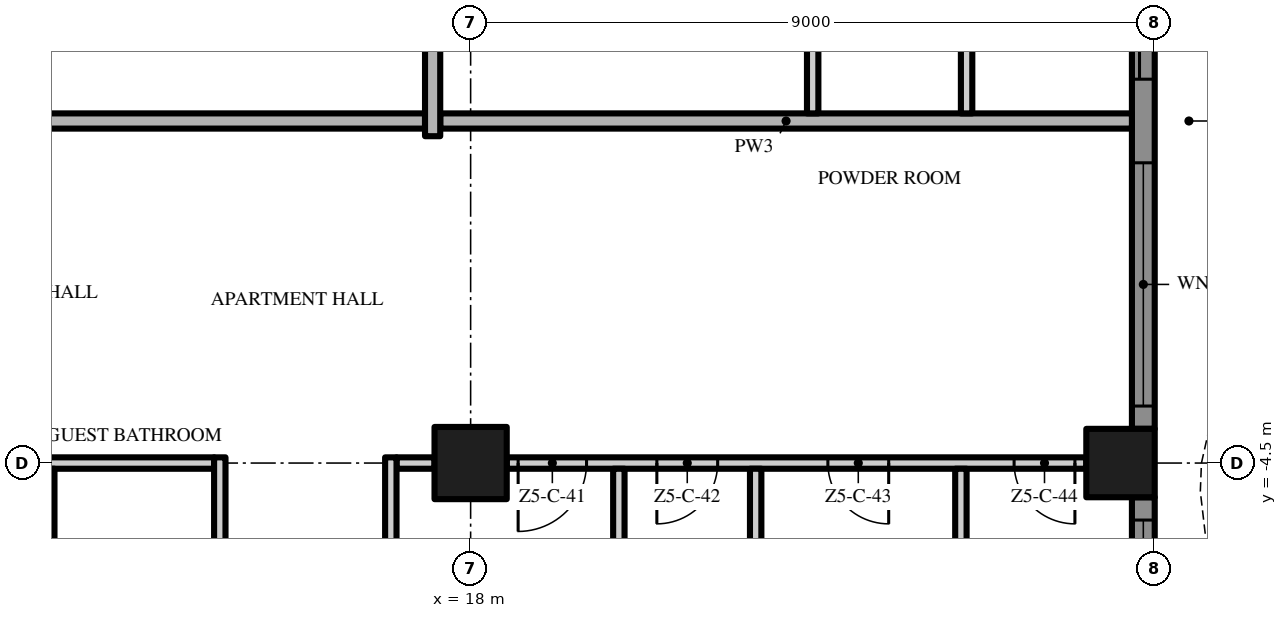
"""IFC4 building model, lengths in metres.
Left out: names, types, materials, properties, quantities, classifications, styles, units other than length and angle.
Written with IfcOpenShell. Run it as: python <this file> out.ifc"""

import sys

from ifc_helpers import new_model, si_unit, direction, frame, frame_2d, origin, origin_2d, place, context, subcontext, project, spatial, polyline, rectangle, outline, extrude, element, fill, save


model = new_model("IFC4")
c1 = context("Model", 3, precision=1e-05, world=origin(), true_north=direction((0.0, 1.0)))
c2 = subcontext(c1, "Body", "Model", "MODEL_VIEW")
j1 = project(units=[si_unit("LENGTHUNIT", "METRE"), si_unit("PLANEANGLEUNIT", "RADIAN")], contexts=[c1])
p1 = place(None, origin())
s1 = spatial("IfcSite", under=j1, at=p1, CompositionType="ELEMENT")
p2 = place(p1, origin())
s2 = spatial("IfcBuilding", under=s1, at=p2, CompositionType="ELEMENT")
p3 = place(p2, frame((0.0, 0.0, 269.2)))
s3 = spatial("IfcBuildingStorey", under=s2, at=p3, CompositionType="ELEMENT", Elevation=269.2)
p4 = place(p3, frame((18.0, -4.5, 0.0), z_axis=(0.0, 0.0, 1.0), x_axis=(1.0, 0.0, 0.0)))
e1 = element("IfcColumn", 1, at=p4, inside=s3, PredefinedType="COLUMN", context=c2, shape_type="SweptSolid", body=[
    extrude(rectangle(XDim=0.95, YDim=0.95, at=origin_2d()), origin(), (0.0, 0.0, 1.0), 3.5),
])
p5 = place(p3, frame((26.55, -4.5, 0.0), z_axis=(0.0, 0.0, 1.0), x_axis=(1.0, 0.0, 0.0)))
e2 = element("IfcColumn", 2, at=p5, inside=s3, PredefinedType="COLUMN", context=c2, shape_type="SweptSolid", body=[
    extrude(rectangle(XDim=0.9, YDim=0.9, at=origin_2d()), origin(), (0.0, 0.0, 1.0), 3.5),
])
p6 = place(p3, frame((26.85, -4.95, 0.0), z_axis=(0.0, 0.0, 1.0), x_axis=(0.0, -1.0, 0.0)))
e3 = element("IfcWall", 3, at=p6, inside=s3, PredefinedType="SOLIDWALL", context=c2, shape_type="SweptSolid", body=[
    extrude(rectangle(XDim=8.1, YDim=0.3, at=frame_2d((4.05, 0.0))), origin(), (0.0, 0.0, 1.0), 3.5),
])
p7 = place(p6, frame((4.6, 0.0, 0.0)))
e4 = element("IfcOpeningElement", 4, at=p7, cuts=e3, PredefinedType="OPENING", context=c2, shape_type="SweptSolid", body=[
    extrude(rectangle(XDim=3.2, YDim=2.4, at=frame_2d((1.6, 1.2))), frame((0.0, 0.16, 0.0), z_axis=(0.0, -1.0, 0.0), x_axis=(1.0, 0.0, 0.0)), (0.0, 0.0, 1.0), 0.32),
])
p8 = place(p6, frame((0.3, 0.0, 0.45)))
e5 = element("IfcOpeningElement", 5, at=p8, cuts=e3, PredefinedType="OPENING", context=c2, shape_type="SweptSolid", body=[
    extrude(rectangle(XDim=3.2, YDim=2.65, at=frame_2d((1.6, 1.325))), frame((0.0, 0.16, 0.0), z_axis=(0.0, -1.0, 0.0), x_axis=(1.0, 0.0, 0.0)), (0.0, 0.0, 1.0), 0.32),
])
p9 = place(p3, frame((26.85, 4.05, 0.0), z_axis=(0.0, 0.0, 1.0), x_axis=(0.0, -1.0, 0.0)))
e6 = element("IfcWall", 6, at=p9, inside=s3, PredefinedType="SOLIDWALL", context=c2, shape_type="SweptSolid", body=[
    extrude(rectangle(XDim=8.1, YDim=0.3, at=frame_2d((4.05, 0.0))), origin(), (0.0, 0.0, 1.0), 3.5),
])
p10 = place(p9, frame((4.6, 0.0, 0.45)))
e7 = element("IfcOpeningElement", 7, at=p10, cuts=e6, PredefinedType="OPENING", context=c2, shape_type="SweptSolid", body=[
    extrude(rectangle(XDim=3.2, YDim=2.65, at=frame_2d((1.6, 1.325))), frame((0.0, 0.16, 0.0), z_axis=(0.0, -1.0, 0.0), x_axis=(1.0, 0.0, 0.0)), (0.0, 0.0, 1.0), 0.32),
])
p11 = place(p9, frame((0.3, 0.0, 0.0)))
e8 = element("IfcOpeningElement", 8, at=p11, cuts=e6, PredefinedType="OPENING", context=c2, shape_type="SweptSolid", body=[
    extrude(rectangle(XDim=3.2, YDim=2.4, at=frame_2d((1.6, 1.2))), frame((0.0, 0.16, 0.0), z_axis=(0.0, -1.0, 0.0), x_axis=(1.0, 0.0, 0.0)), (0.0, 0.0, 1.0), 0.32),
])
p12 = place(p3, origin())
e9 = element("IfcWall", 9, at=p12, inside=s3, PredefinedType="USERDEFINED", context=c2, shape_type="SweptSolid", body=[
    extrude(outline(polyline([(27.951, -18.0), (28.612, -16.5), (29.345, -15.0), (29.869, -13.5), (30.0, -12.375), (29.985, -12.0), (29.649, -10.5), (28.988, -9.0), (28.255, -7.5), (27.731, -6.0), (27.6, -4.875), (27.615, -4.5), (27.951, -3.0), (28.612, -1.5), (29.345, 0.0), (29.869, 1.5), (30.0, 2.625), (29.985, 3.0), (29.649, 4.5), (28.988, 6.0), (28.255, 7.5), (27.731, 9.0), (27.6, 10.125), (27.615, 10.5), (27.951, 12.0), (28.612, 13.5), (29.345, 15.0), (29.869, 16.5), (30.0, 17.625), (29.985, 18.0), (29.735, 17.99), (29.749, 17.635), (29.624, 16.556), (29.114, 15.096), (28.385, 13.605), (27.713, 12.079), (27.366, 10.533), (27.349, 10.115), (27.486, 8.944), (28.024, 7.404), (28.761, 5.895), (29.41, 4.421), (29.736, 2.967), (29.749, 2.635), (29.624, 1.556), (29.114, 0.096), (28.385, -1.395), (27.713, -2.921), (27.366, -4.467), (27.349, -4.885), (27.486, -6.056), (28.024, -7.596), (28.761, -9.105), (29.41, -10.579), (29.736, -12.033), (29.749, -12.365), (29.624, -13.444), (29.114, -14.904), (28.385, -16.395), (27.723, -17.899), (27.951, -18.0)])), origin(), (0.0, 0.0, 1.0), 0.9),
])
p13 = place(p3, frame((9.475, -4.5, 0.0), z_axis=(0.0, 0.0, 1.0), x_axis=(1.0, 0.0, 0.0)))
e10 = element("IfcWall", 10, at=p13, inside=s3, PredefinedType="PARTITIONING", context=c2, shape_type="SweptSolid", body=[
    extrude(rectangle(XDim=5.15, YDim=0.15, at=frame_2d((2.575, 0.0))), origin(), (0.0, 0.0, 1.0), 3.5),
])
p14 = place(p3, frame((17.025, -4.5, 0.0), z_axis=(0.0, 0.0, 1.0), x_axis=(1.0, 0.0, 0.0)))
e11 = element("IfcWall", 11, at=p14, inside=s3, PredefinedType="PARTITIONING", context=c2, shape_type="SweptSolid", body=[
    extrude(rectangle(XDim=0.5, YDim=0.15, at=frame_2d((0.25, 0.0))), origin(), (0.0, 0.0, 1.0), 3.5),
])
p15 = place(p3, frame((26.1, -4.5, 0.0), z_axis=(0.0, 0.0, 1.0), x_axis=(-1.0, 0.0, 0.0)))
e12 = element("IfcWall", 12, at=p15, inside=s3, PredefinedType="PARTITIONING", context=c2, shape_type="SweptSolid", body=[
    extrude(rectangle(XDim=7.625, YDim=0.15, at=frame_2d((3.812, 0.0))), origin(), (0.0, 0.0, 1.0), 3.5),
])
p16 = place(p15, frame((6.575, 0.0, 0.0)))
e13 = element("IfcOpeningElement", 13, at=p16, cuts=e12, PredefinedType="OPENING", context=c2, shape_type="SweptSolid", body=[
    extrude(rectangle(XDim=0.9, YDim=2.1, at=frame_2d((0.45, 1.05))), frame((0.0, 0.085, 0.0), z_axis=(0.0, -1.0, 0.0), x_axis=(1.0, 0.0, 0.0)), (0.0, 0.0, 1.0), 0.17),
])
p17 = place(p15, frame((4.85, 0.0, 0.0)))
e14 = element("IfcOpeningElement", 14, at=p17, cuts=e12, PredefinedType="OPENING", context=c2, shape_type="SweptSolid", body=[
    extrude(rectangle(XDim=0.8, YDim=2.0, at=frame_2d((0.4, 1.0))), frame((0.0, 0.085, 0.0), z_axis=(0.0, -1.0, 0.0), x_axis=(1.0, 0.0, 0.0)), (0.0, 0.0, 1.0), 0.17),
])
p18 = place(p15, frame((2.6, 0.0, 0.0)))
e15 = element("IfcOpeningElement", 15, at=p18, cuts=e12, PredefinedType="OPENING", context=c2, shape_type="SweptSolid", body=[
    extrude(rectangle(XDim=0.8, YDim=2.0, at=frame_2d((0.4, 1.0))), frame((0.0, 0.085, 0.0), z_axis=(0.0, -1.0, 0.0), x_axis=(1.0, 0.0, 0.0)), (0.0, 0.0, 1.0), 0.17),
])
p19 = place(p15, frame((0.15, 0.0, 0.0)))
e16 = element("IfcOpeningElement", 16, at=p19, cuts=e12, PredefinedType="OPENING", context=c2, shape_type="SweptSolid", body=[
    extrude(rectangle(XDim=0.8, YDim=2.0, at=frame_2d((0.4, 1.0))), frame((0.0, 0.085, 0.0), z_axis=(0.0, -1.0, 0.0), x_axis=(1.0, 0.0, 0.0)), (0.0, 0.0, 1.0), 0.17),
])
p20 = place(p3, frame((17.4, 0.0, 0.0), z_axis=(0.0, 0.0, 1.0), x_axis=(-1.0, 0.0, 0.0)))
e17 = element("IfcWall", 17, at=p20, inside=s3, PredefinedType="PARTITIONING", context=c2, shape_type="SweptSolid", body=[
    extrude(rectangle(XDim=34.8, YDim=0.2, at=frame_2d((17.4, 0.0))), origin(), (0.0, 0.0, 1.0), 3.5),
])
p21 = place(p20, frame((23.4, 0.0, 0.0)))
e18 = element("IfcOpeningElement", 18, at=p21, cuts=e17, PredefinedType="OPENING", context=c2, shape_type="SweptSolid", body=[
    extrude(rectangle(XDim=1.5, YDim=2.4, at=frame_2d((0.75, 1.2))), frame((0.0, 0.11, 0.0), z_axis=(0.0, -1.0, 0.0), x_axis=(1.0, 0.0, 0.0)), (0.0, 0.0, 1.0), 0.22),
])
p22 = place(p20, frame((5.4, 0.0, 0.0)))
e19 = element("IfcOpeningElement", 19, at=p22, cuts=e17, PredefinedType="OPENING", context=c2, shape_type="SweptSolid", body=[
    extrude(rectangle(XDim=1.5, YDim=2.4, at=frame_2d((0.75, 1.2))), frame((0.0, 0.11, 0.0), z_axis=(0.0, -1.0, 0.0), x_axis=(1.0, 0.0, 0.0)), (0.0, 0.0, 1.0), 0.22),
])
p23 = place(p3, frame((17.6, 0.0, 0.0), z_axis=(0.0, 0.0, 1.0), x_axis=(1.0, 0.0, 0.0)))
e20 = element("IfcWall", 20, at=p23, inside=s3, PredefinedType="PARTITIONING", context=c2, shape_type="SweptSolid", body=[
    extrude(rectangle(XDim=9.1, YDim=0.2, at=frame_2d((4.55, 0.0))), origin(), (0.0, 0.0, 1.0), 3.5),
])
p24 = place(p3, frame((12.45, -8.925, 0.0), z_axis=(0.0, 0.0, 1.0), x_axis=(0.0, 1.0, 0.0)))
e21 = element("IfcWall", 21, at=p24, inside=s3, PredefinedType="PARTITIONING", context=c2, shape_type="SweptSolid", body=[
    extrude(rectangle(XDim=4.35, YDim=0.15, at=frame_2d((2.175, 0.0))), origin(), (0.0, 0.0, 1.0), 3.5),
])
p25 = place(p3, frame((14.7, -9.075, 0.0), z_axis=(0.0, 0.0, 1.0), x_axis=(0.0, 1.0, 0.0)))
e22 = element("IfcWall", 22, at=p25, inside=s3, PredefinedType="PARTITIONING", context=c2, shape_type="SweptSolid", body=[
    extrude(rectangle(XDim=4.65, YDim=0.15, at=frame_2d((2.325, 0.0))), origin(), (0.0, 0.0, 1.0), 3.5),
])
p26 = place(p25, frame((1.875, 0.0, 0.0)))
e23 = element("IfcOpeningElement", 23, at=p26, cuts=e22, PredefinedType="OPENING", context=c2, shape_type="SweptSolid", body=[
    extrude(rectangle(XDim=0.9, YDim=2.1, at=frame_2d((0.45, 1.05))), frame((0.0, 0.085, 0.0), z_axis=(0.0, -1.0, 0.0), x_axis=(1.0, 0.0, 0.0)), (0.0, 0.0, 1.0), 0.17),
])
p27 = place(p3, frame((16.95, -9.075, 0.0), z_axis=(0.0, 0.0, 1.0), x_axis=(0.0, 1.0, 0.0)))
e24 = element("IfcWall", 24, at=p27, inside=s3, PredefinedType="PARTITIONING", context=c2, shape_type="SweptSolid", body=[
    extrude(rectangle(XDim=4.65, YDim=0.15, at=frame_2d((2.325, 0.0))), origin(), (0.0, 0.0, 1.0), 3.5),
])
p28 = place(p3, frame((17.5, -0.2, 0.0), z_axis=(0.0, 0.0, 1.0), x_axis=(0.0, 1.0, 0.0)))
e25 = element("IfcWall", 25, at=p28, inside=s3, PredefinedType="PARTITIONING", context=c2, shape_type="SweptSolid", body=[
    extrude(rectangle(XDim=4.225, YDim=0.2, at=frame_2d((2.112, 0.0))), origin(), (0.0, 0.0, 1.0), 3.5),
])
for number, where, z_axis, x_axis in (
    (26, (19.95, -8.925, 0.0), (0.0, 0.0, 1.0), (0.0, 1.0, 0.0)),
    (27, (21.75, -8.925, 0.0), (0.0, 0.0, 1.0), (0.0, 1.0, 0.0)),
):
    element("IfcWall", number, at=place(p3, frame(where, z_axis=z_axis, x_axis=x_axis)), inside=s3, PredefinedType="PARTITIONING", context=c2, shape_type="SweptSolid", body=[
        extrude(rectangle(XDim=4.35, YDim=0.15, at=frame_2d((2.175, 0.0))), origin(), (0.0, 0.0, 1.0), 3.5),
    ])
p29 = place(p3, frame((22.5, 17.55, 0.0), z_axis=(0.0, 0.0, 1.0), x_axis=(0.0, -1.0, 0.0)))
e28 = element("IfcWall", 28, at=p29, inside=s3, PredefinedType="PARTITIONING", context=c2, shape_type="SweptSolid", body=[
    extrude(rectangle(XDim=17.45, YDim=0.15, at=frame_2d((8.725, 0.0))), origin(), (0.0, 0.0, 1.0), 3.5),
])
p30 = place(p29, frame((13.25, 0.0, 0.0)))
e29 = element("IfcOpeningElement", 29, at=p30, cuts=e28, PredefinedType="OPENING", context=c2, shape_type="SweptSolid", body=[
    extrude(rectangle(XDim=1.8, YDim=2.4, at=frame_2d((0.9, 1.2))), frame((0.0, 0.085, 0.0), z_axis=(0.0, -1.0, 0.0), x_axis=(1.0, 0.0, 0.0)), (0.0, 0.0, 1.0), 0.17),
])
p31 = place(p29, frame((5.8, 0.0, 0.0)))
e30 = element("IfcOpeningElement", 30, at=p31, cuts=e28, PredefinedType="OPENING", context=c2, shape_type="SweptSolid", body=[
    extrude(rectangle(XDim=1.0, YDim=2.4, at=frame_2d((0.5, 1.2))), frame((0.0, 0.085, 0.0), z_axis=(0.0, -1.0, 0.0), x_axis=(1.0, 0.0, 0.0)), (0.0, 0.0, 1.0), 0.17),
])
p32 = place(p3, frame((24.45, -8.925, 0.0), z_axis=(0.0, 0.0, 1.0), x_axis=(0.0, 1.0, 0.0)))
e31 = element("IfcWall", 31, at=p32, inside=s3, PredefinedType="PARTITIONING", context=c2, shape_type="SweptSolid", body=[
    extrude(rectangle(XDim=4.35, YDim=0.15, at=frame_2d((2.175, 0.0))), origin(), (0.0, 0.0, 1.0), 3.5),
])
p33 = place(p3, frame((24.525, 0.1, 0.0), z_axis=(0.0, 0.0, 1.0), x_axis=(0.0, 1.0, 0.0)))
e32 = element("IfcWall", 32, at=p33, inside=s3, PredefinedType="PARTITIONING", context=c2, shape_type="SweptSolid", body=[
    extrude(rectangle(XDim=2.225, YDim=0.15, at=frame_2d((1.113, 0.0))), origin(), (0.0, 0.0, 1.0), 3.5),
])
p34 = place(p8, origin())
e33 = element("IfcWindow", 33, at=p34, inside=s3, PartitioningType="SINGLE_PANEL", PredefinedType="WINDOW", context=c2, shape_type="SweptSolid", body=[
    extrude(rectangle(XDim=3.2, YDim=2.65, at=frame_2d((1.6, 1.325))), frame((0.0, 0.03, 0.0), z_axis=(0.0, -1.0, 0.0), x_axis=(1.0, 0.0, 0.0)), (0.0, 0.0, 1.0), 0.06),
])
fill(e5, e33)
p35 = place(p10, origin())
e34 = element("IfcWindow", 34, at=p35, inside=s3, PartitioningType="SINGLE_PANEL", PredefinedType="WINDOW", context=c2, shape_type="SweptSolid", body=[
    extrude(rectangle(XDim=3.2, YDim=2.65, at=frame_2d((1.6, 1.325))), frame((0.0, 0.03, 0.0), z_axis=(0.0, -1.0, 0.0), x_axis=(1.0, 0.0, 0.0)), (0.0, 0.0, 1.0), 0.06),
])
fill(e7, e34)
p36 = place(p11, origin())
e35 = element("IfcDoor", 35, at=p36, inside=s3, OperationType="SINGLE_SWING_LEFT", PredefinedType="DOOR", context=c2, shape_type="SweptSolid", body=[
    extrude(rectangle(XDim=3.2, YDim=2.4, at=frame_2d((1.6, 1.2))), frame((0.0, 0.025, 0.0), z_axis=(0.0, -1.0, 0.0), x_axis=(1.0, 0.0, 0.0)), (0.0, 0.0, 1.0), 0.05),
])
fill(e8, e35)
p37 = place(p16, origin())
e36 = element("IfcDoor", 36, at=p37, inside=s3, OperationType="SINGLE_SWING_RIGHT", PredefinedType="DOOR", context=c2, shape_type="SweptSolid", body=[
    extrude(rectangle(XDim=0.9, YDim=2.1, at=frame_2d((0.45, 1.05))), frame((0.0, 0.025, 0.0), z_axis=(0.0, -1.0, 0.0), x_axis=(1.0, 0.0, 0.0)), (0.0, 0.0, 1.0), 0.05),
])
fill(e13, e36)
p38 = place(p17, origin())
e37 = element("IfcDoor", 37, at=p38, inside=s3, OperationType="SINGLE_SWING_RIGHT", PredefinedType="DOOR", context=c2, shape_type="SweptSolid", body=[
    extrude(rectangle(XDim=0.8, YDim=2.0, at=frame_2d((0.4, 1.0))), frame((0.0, 0.025, 0.0), z_axis=(0.0, -1.0, 0.0), x_axis=(1.0, 0.0, 0.0)), (0.0, 0.0, 1.0), 0.05),
])
fill(e14, e37)
p39 = place(p18, origin())
e38 = element("IfcDoor", 38, at=p39, inside=s3, OperationType="SINGLE_SWING_LEFT", PredefinedType="DOOR", context=c2, shape_type="SweptSolid", body=[
    extrude(rectangle(XDim=0.8, YDim=2.0, at=frame_2d((0.4, 1.0))), frame((0.0, 0.025, 0.0), z_axis=(0.0, -1.0, 0.0), x_axis=(1.0, 0.0, 0.0)), (0.0, 0.0, 1.0), 0.05),
])
fill(e15, e38)
p40 = place(p19, origin())
e39 = element("IfcDoor", 39, at=p40, inside=s3, OperationType="SINGLE_SWING_LEFT", PredefinedType="DOOR", context=c2, shape_type="SweptSolid", body=[
    extrude(rectangle(XDim=0.8, YDim=2.0, at=frame_2d((0.4, 1.0))), frame((0.0, 0.025, 0.0), z_axis=(0.0, -1.0, 0.0), x_axis=(1.0, 0.0, 0.0)), (0.0, 0.0, 1.0), 0.05),
])
fill(e16, e39)
save(model, sys.argv[1])
